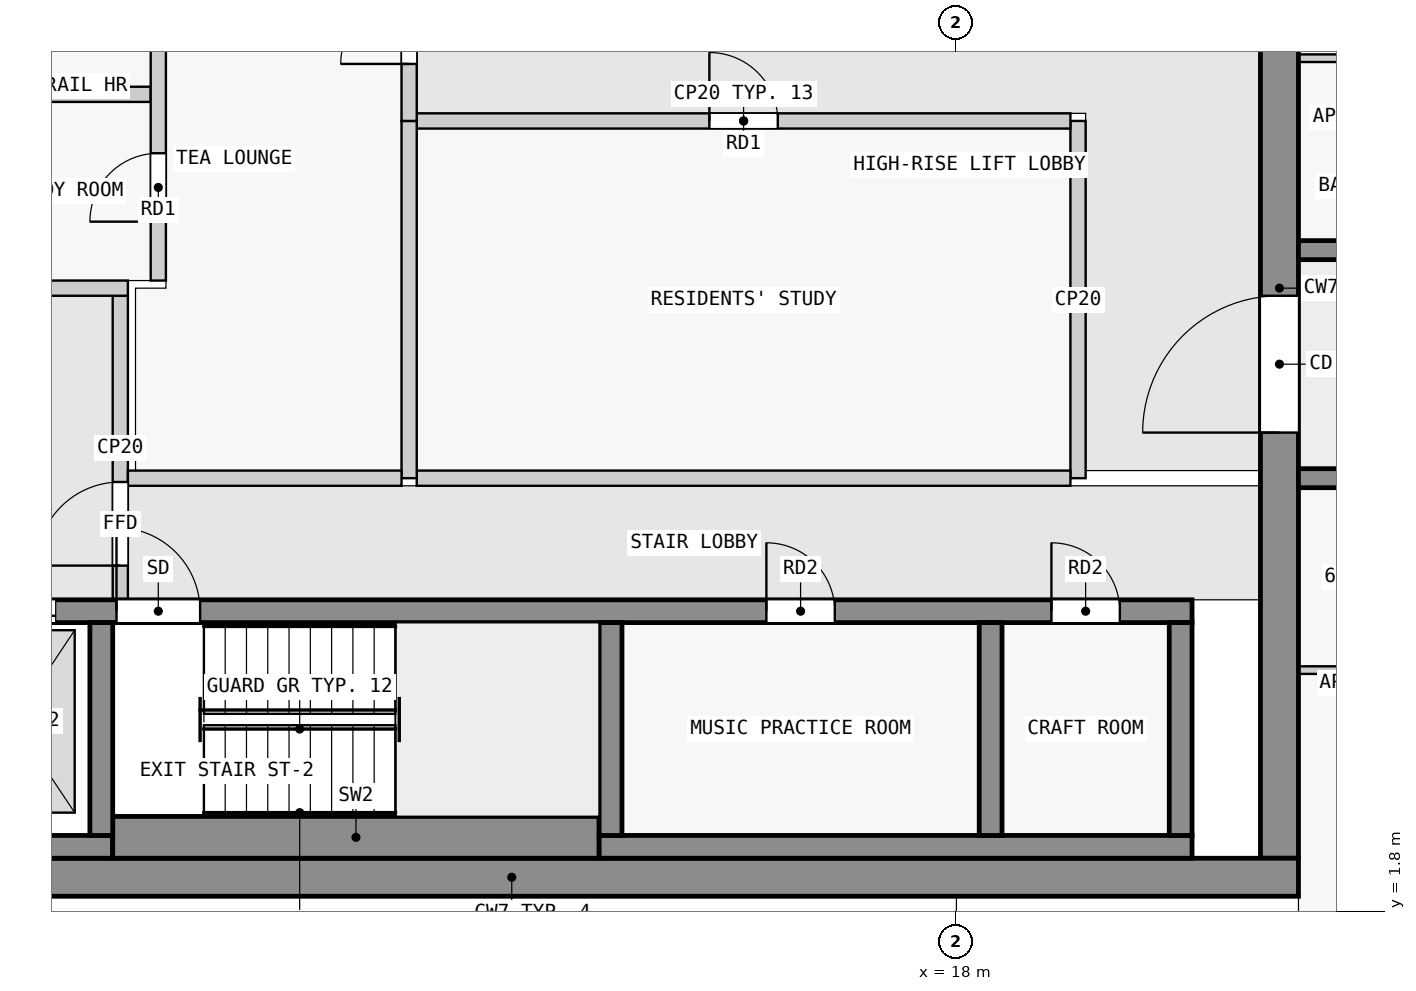
"""IFC4 building model, lengths in metres.
Left out: names, types, materials, properties, quantities, classifications, styles, units other than length and angle.
Written with IfcOpenShell. Run it as: python <this file> out.ifc"""

import sys

from ifc_helpers import new_model, si_unit, direction, frame, frame_2d, origin, place, context, subcontext, project, spatial, rectangle, extrude, element, fill, save


model = new_model("IFC4")
c1 = context("Model", 3, precision=1e-05, world=origin(), true_north=direction((0.0, 1.0)))
c2 = subcontext(c1, "Body", "Model", "MODEL_VIEW")
j1 = project(units=[si_unit("LENGTHUNIT", "METRE"), si_unit("PLANEANGLEUNIT", "RADIAN")], contexts=[c1])
p1 = place(None, origin())
s1 = spatial("IfcSite", under=j1, at=p1, CompositionType="ELEMENT")
p2 = place(p1, origin())
s2 = spatial("IfcBuilding", under=s1, at=p2, CompositionType="ELEMENT")
p3 = place(p2, frame((0.0, 0.0, 245.9)))
s3 = spatial("IfcBuildingStorey", under=s2, at=p3, CompositionType="ELEMENT", Elevation=245.9)
p4 = place(p3, frame((1.8, 2.25, 0.0), z_axis=(0.0, 0.0, 1.0), x_axis=(1.0, 0.0, 0.0)))
e1 = element("IfcWall", 1, at=p4, inside=s3, PredefinedType="SHEAR", context=c2, shape_type="SweptSolid", body=[
    extrude(rectangle(XDim=20.7, YDim=0.5, at=frame_2d((10.35, 0.0))), origin(), (0.0, 0.0, 1.0), 3.25),
])
p5 = place(p3, frame((22.25, 2.5, 0.0), z_axis=(0.0, 0.0, 1.0), x_axis=(0.0, 1.0, 0.0)))
e2 = element("IfcWall", 2, at=p5, inside=s3, PredefinedType="SHEAR", context=c2, shape_type="SweptSolid", body=[
    extrude(rectangle(XDim=15.0, YDim=0.5, at=frame_2d((7.5, 0.0))), origin(), (0.0, 0.0, 1.0), 3.25),
])
p6 = place(p5, frame((5.6, 0.0, 0.0)))
e3 = element("IfcOpeningElement", 3, at=p6, cuts=e2, PredefinedType="OPENING", context=c2, shape_type="SweptSolid", body=[
    extrude(rectangle(XDim=1.8, YDim=2.1, at=frame_2d((0.9, 1.05))), frame((0.0, 0.26, 0.0), z_axis=(0.0, -1.0, 0.0), x_axis=(1.0, 0.0, 0.0)), (0.0, 0.0, 1.0), 0.52),
])
p7 = place(p3, frame((2.3, 2.65, 0.0), z_axis=(0.0, 0.0, 1.0), x_axis=(1.0, 0.0, 0.0)))
e4 = element("IfcWall", 4, at=p7, inside=s3, PredefinedType="SHEAR", context=c2, shape_type="SweptSolid", body=[
    extrude(rectangle(XDim=4.6, YDim=0.3, at=frame_2d((2.3, 0.0))), origin(), (0.0, 0.0, 1.0), 3.25),
])
p8 = place(p3, frame((6.9, 2.775, 0.0), z_axis=(0.0, 0.0, 1.0), x_axis=(1.0, 0.0, 0.0)))
e5 = element("IfcWall", 5, at=p8, inside=s3, PredefinedType="SHEAR", context=c2, shape_type="SweptSolid", body=[
    extrude(rectangle(XDim=6.4, YDim=0.55, at=frame_2d((3.2, 0.0))), origin(), (0.0, 0.0, 1.0), 3.25),
])
p9 = place(p3, frame((13.3, 2.65, 0.0), z_axis=(0.0, 0.0, 1.0), x_axis=(1.0, 0.0, 0.0)))
e6 = element("IfcWall", 6, at=p9, inside=s3, PredefinedType="SHEAR", context=c2, shape_type="SweptSolid", body=[
    extrude(rectangle(XDim=7.8, YDim=0.3, at=frame_2d((3.9, 0.0))), origin(), (0.0, 0.0, 1.0), 3.25),
])
for number, where, z_axis, x_axis in (
    (7, (6.75, 2.8, 0.0), (0.0, 0.0, 1.0), (0.0, 1.0, 0.0)),
    (8, (13.45, 2.8, 0.0), (0.0, 0.0, 1.0), (0.0, 1.0, 0.0)),
    (9, (18.45, 2.8, 0.0), (0.0, 0.0, 1.0), (0.0, 1.0, 0.0)),
    (10, (20.95, 2.8, 0.0), (0.0, 0.0, 1.0), (0.0, 1.0, 0.0)),
):
    element("IfcWall", number, at=place(p3, frame(where, z_axis=z_axis, x_axis=x_axis)), inside=s3, PredefinedType="SHEAR", context=c2, shape_type="SweptSolid", body=[
        extrude(rectangle(XDim=2.8, YDim=0.3, at=frame_2d((1.4, 0.0))), origin(), (0.0, 0.0, 1.0), 3.25),
    ])
p10 = place(p3, frame((2.3, 5.75, 0.0), z_axis=(0.0, 0.0, 1.0), x_axis=(1.0, 0.0, 0.0)))
e11 = element("IfcWall", 11, at=p10, inside=s3, PredefinedType="SHEAR", context=c2, shape_type="SweptSolid", body=[
    extrude(rectangle(XDim=18.8, YDim=0.3, at=frame_2d((9.4, 0.0))), origin(), (0.0, 0.0, 1.0), 3.25),
])
p11 = place(p10, frame((4.65, 0.0, 0.0)))
e12 = element("IfcOpeningElement", 12, at=p11, cuts=e11, PredefinedType="OPENING", context=c2, shape_type="SweptSolid", body=[
    extrude(rectangle(XDim=1.1, YDim=2.1, at=frame_2d((0.55, 1.05))), frame((0.0, 0.16, 0.0), z_axis=(0.0, -1.0, 0.0), x_axis=(1.0, 0.0, 0.0)), (0.0, 0.0, 1.0), 0.32),
])
p12 = place(p10, frame((0.45, 0.0, 0.0)))
e13 = element("IfcOpeningElement", 13, at=p12, cuts=e11, PredefinedType="OPENING", context=c2, shape_type="SweptSolid", body=[
    extrude(rectangle(XDim=1.1, YDim=2.1, at=frame_2d((0.55, 1.05))), frame((0.0, 0.16, 0.0), z_axis=(0.0, -1.0, 0.0), x_axis=(1.0, 0.0, 0.0)), (0.0, 0.0, 1.0), 0.32),
])
p13 = place(p10, frame((2.75, 0.0, 0.0)))
e14 = element("IfcOpeningElement", 14, at=p13, cuts=e11, PredefinedType="OPENING", context=c2, shape_type="SweptSolid", body=[
    extrude(rectangle(XDim=1.1, YDim=2.1, at=frame_2d((0.55, 1.05))), frame((0.0, 0.16, 0.0), z_axis=(0.0, -1.0, 0.0), x_axis=(1.0, 0.0, 0.0)), (0.0, 0.0, 1.0), 0.32),
])
p14 = place(p10, frame((13.2, 0.0, 0.0)))
e15 = element("IfcOpeningElement", 15, at=p14, cuts=e11, PredefinedType="OPENING", context=c2, shape_type="SweptSolid", body=[
    extrude(rectangle(XDim=0.9, YDim=2.1, at=frame_2d((0.45, 1.05))), frame((0.0, 0.16, 0.0), z_axis=(0.0, -1.0, 0.0), x_axis=(1.0, 0.0, 0.0)), (0.0, 0.0, 1.0), 0.32),
])
p15 = place(p10, frame((16.95, 0.0, 0.0)))
e16 = element("IfcOpeningElement", 16, at=p15, cuts=e11, PredefinedType="OPENING", context=c2, shape_type="SweptSolid", body=[
    extrude(rectangle(XDim=0.9, YDim=2.1, at=frame_2d((0.45, 1.05))), frame((0.0, 0.16, 0.0), z_axis=(0.0, -1.0, 0.0), x_axis=(1.0, 0.0, 0.0)), (0.0, 0.0, 1.0), 0.32),
])
p16 = place(p3, frame((22.5, 7.5, 0.0), z_axis=(0.0, 0.0, 1.0), x_axis=(1.0, 0.0, 0.0)))
e17 = element("IfcWall", 17, at=p16, inside=s3, PredefinedType="SHEAR", context=c2, shape_type="SweptSolid", body=[
    extrude(rectangle(XDim=22.5, YDim=0.25, at=frame_2d((11.25, 0.0))), origin(), (0.0, 0.0, 1.0), 3.25),
])
p17 = place(p16, frame((1.75, 0.0, 0.0)))
e18 = element("IfcOpeningElement", 18, at=p17, cuts=e17, PredefinedType="OPENING", context=c2, shape_type="SweptSolid", body=[
    extrude(rectangle(XDim=1.0, YDim=2.1, at=frame_2d((0.5, 1.05))), frame((0.0, 0.135, 0.0), z_axis=(0.0, -1.0, 0.0), x_axis=(1.0, 0.0, 0.0)), (0.0, 0.0, 1.0), 0.27),
])
p18 = place(p16, frame((5.85, 0.0, 0.0)))
e19 = element("IfcOpeningElement", 19, at=p18, cuts=e17, PredefinedType="OPENING", context=c2, shape_type="SweptSolid", body=[
    extrude(rectangle(XDim=1.8, YDim=2.1, at=frame_2d((0.9, 1.05))), frame((0.0, 0.135, 0.0), z_axis=(0.0, -1.0, 0.0), x_axis=(1.0, 0.0, 0.0)), (0.0, 0.0, 1.0), 0.27),
])
p19 = place(p16, frame((13.05, 0.0, 0.0)))
e20 = element("IfcOpeningElement", 20, at=p19, cuts=e17, PredefinedType="OPENING", context=c2, shape_type="SweptSolid", body=[
    extrude(rectangle(XDim=1.0, YDim=2.1, at=frame_2d((0.5, 1.05))), frame((0.0, 0.135, 0.0), z_axis=(0.0, -1.0, 0.0), x_axis=(1.0, 0.0, 0.0)), (0.0, 0.0, 1.0), 0.27),
])
p20 = place(p16, frame((18.75, 0.0, 0.0)))
e21 = element("IfcOpeningElement", 21, at=p20, cuts=e17, PredefinedType="OPENING", context=c2, shape_type="SweptSolid", body=[
    extrude(rectangle(XDim=0.9, YDim=2.1, at=frame_2d((0.45, 1.05))), frame((0.0, 0.135, 0.0), z_axis=(0.0, -1.0, 0.0), x_axis=(1.0, 0.0, 0.0)), (0.0, 0.0, 1.0), 0.27),
])
p21 = place(p16, frame((20.95, 0.0, 0.0)))
e22 = element("IfcOpeningElement", 22, at=p21, cuts=e17, PredefinedType="OPENING", context=c2, shape_type="SweptSolid", body=[
    extrude(rectangle(XDim=1.0, YDim=2.1, at=frame_2d((0.5, 1.05))), frame((0.0, 0.135, 0.0), z_axis=(0.0, -1.0, 0.0), x_axis=(1.0, 0.0, 0.0)), (0.0, 0.0, 1.0), 0.27),
])
p22 = place(p3, frame((22.5, 10.5, 0.0), z_axis=(0.0, 0.0, 1.0), x_axis=(1.0, 0.0, 0.0)))
e23 = element("IfcWall", 23, at=p22, inside=s3, PredefinedType="SHEAR", context=c2, shape_type="SweptSolid", body=[
    extrude(rectangle(XDim=22.5, YDim=0.25, at=frame_2d((11.25, 0.0))), origin(), (0.0, 0.0, 1.0), 3.25),
])
p23 = place(p22, frame((4.05, 0.0, 0.0)))
e24 = element("IfcOpeningElement", 24, at=p23, cuts=e23, PredefinedType="OPENING", context=c2, shape_type="SweptSolid", body=[
    extrude(rectangle(XDim=1.0, YDim=2.1, at=frame_2d((0.5, 1.05))), frame((0.0, 0.135, 0.0), z_axis=(0.0, -1.0, 0.0), x_axis=(1.0, 0.0, 0.0)), (0.0, 0.0, 1.0), 0.27),
])
p24 = place(p22, frame((10.75, 0.0, 0.0)))
e25 = element("IfcOpeningElement", 25, at=p24, cuts=e23, PredefinedType="OPENING", context=c2, shape_type="SweptSolid", body=[
    extrude(rectangle(XDim=1.0, YDim=2.1, at=frame_2d((0.5, 1.05))), frame((0.0, 0.135, 0.0), z_axis=(0.0, -1.0, 0.0), x_axis=(1.0, 0.0, 0.0)), (0.0, 0.0, 1.0), 0.27),
])
p25 = place(p22, frame((16.85, 0.0, 0.0)))
e26 = element("IfcOpeningElement", 26, at=p25, cuts=e23, PredefinedType="OPENING", context=c2, shape_type="SweptSolid", body=[
    extrude(rectangle(XDim=1.0, YDim=2.1, at=frame_2d((0.5, 1.05))), frame((0.0, 0.135, 0.0), z_axis=(0.0, -1.0, 0.0), x_axis=(1.0, 0.0, 0.0)), (0.0, 0.0, 1.0), 0.27),
])
p26 = place(p3, frame((7.0, 5.9, 0.0), z_axis=(0.0, 0.0, 1.0), x_axis=(0.0, 1.0, 0.0)))
e27 = element("IfcWall", 27, at=p26, inside=s3, PredefinedType="PARTITIONING", context=c2, shape_type="SweptSolid", body=[
    extrude(rectangle(XDim=4.0, YDim=0.2, at=frame_2d((2.0, 0.0))), origin(), (0.0, 0.0, 1.0), 3.25),
])
p27 = place(p26, frame((0.45, 0.0, 0.0)))
e28 = element("IfcOpeningElement", 28, at=p27, cuts=e27, PredefinedType="OPENING", context=c2, shape_type="SweptSolid", body=[
    extrude(rectangle(XDim=1.1, YDim=2.1, at=frame_2d((0.55, 1.05))), frame((0.0, 0.11, 0.0), z_axis=(0.0, -1.0, 0.0), x_axis=(1.0, 0.0, 0.0)), (0.0, 0.0, 1.0), 0.22),
])
p28 = place(p3, frame((5.15, 10.0, 0.0), z_axis=(0.0, 0.0, 1.0), x_axis=(1.0, 0.0, 0.0)))
e29 = element("IfcWall", 29, at=p28, inside=s3, PredefinedType="PARTITIONING", context=c2, shape_type="SweptSolid", body=[
    extrude(rectangle(XDim=1.95, YDim=0.2, at=frame_2d((0.975, 0.0))), origin(), (0.0, 0.0, 1.0), 3.25),
])
p29 = place(p3, frame((7.1, 7.5, 0.0), z_axis=(0.0, 0.0, 1.0), x_axis=(1.0, 0.0, 0.0)))
e30 = element("IfcWall", 30, at=p29, inside=s3, PredefinedType="PARTITIONING", context=c2, shape_type="SweptSolid", body=[
    extrude(rectangle(XDim=3.6, YDim=0.2, at=frame_2d((1.8, 0.0))), origin(), (0.0, 0.0, 1.0), 3.25),
])
p30 = place(p3, frame((10.8, 12.2, 0.0), z_axis=(0.0, 0.0, 1.0), x_axis=(0.0, 1.0, 0.0)))
e31 = element("IfcWall", 31, at=p30, inside=s3, PredefinedType="PARTITIONING", context=c2, shape_type="SweptSolid", body=[
    extrude(rectangle(XDim=2.4, YDim=0.2, at=frame_2d((1.2, 0.0))), origin(), (0.0, 0.0, 1.0), 3.25),
])
p31 = place(p30, frame((0.75, 0.0, 0.0)))
e32 = element("IfcOpeningElement", 32, at=p31, cuts=e31, PredefinedType="OPENING", context=c2, shape_type="SweptSolid", body=[
    extrude(rectangle(XDim=0.9, YDim=2.1, at=frame_2d((0.45, 1.05))), frame((0.0, 0.11, 0.0), z_axis=(0.0, -1.0, 0.0), x_axis=(1.0, 0.0, 0.0)), (0.0, 0.0, 1.0), 0.22),
])
p32 = place(p3, frame((10.8, 7.5, 0.0), z_axis=(0.0, 0.0, 1.0), x_axis=(0.0, 1.0, 0.0)))
e33 = element("IfcWall", 33, at=p32, inside=s3, PredefinedType="PARTITIONING", context=c2, shape_type="SweptSolid", body=[
    extrude(rectangle(XDim=4.7, YDim=0.2, at=frame_2d((2.35, 0.0))), origin(), (0.0, 0.0, 1.0), 3.25),
])
p33 = place(p3, frame((10.9, 7.5, 0.0), z_axis=(0.0, 0.0, 1.0), x_axis=(1.0, 0.0, 0.0)))
e34 = element("IfcWall", 34, at=p33, inside=s3, PredefinedType="PARTITIONING", context=c2, shape_type="SweptSolid", body=[
    extrude(rectangle(XDim=8.6, YDim=0.2, at=frame_2d((4.3, 0.0))), origin(), (0.0, 0.0, 1.0), 3.25),
])
p34 = place(p3, frame((19.6, 7.5, 0.0), z_axis=(0.0, 0.0, 1.0), x_axis=(0.0, 1.0, 0.0)))
e35 = element("IfcWall", 35, at=p34, inside=s3, PredefinedType="PARTITIONING", context=c2, shape_type="SweptSolid", body=[
    extrude(rectangle(XDim=4.7, YDim=0.2, at=frame_2d((2.35, 0.0))), origin(), (0.0, 0.0, 1.0), 3.25),
])
p35 = place(p3, frame((10.9, 12.2, 0.0), z_axis=(0.0, 0.0, 1.0), x_axis=(1.0, 0.0, 0.0)))
e36 = element("IfcWall", 36, at=p35, inside=s3, PredefinedType="PARTITIONING", context=c2, shape_type="SweptSolid", body=[
    extrude(rectangle(XDim=8.6, YDim=0.2, at=frame_2d((4.3, 0.0))), origin(), (0.0, 0.0, 1.0), 3.25),
])
p36 = place(p35, frame((3.85, 0.0, 0.0)))
e37 = element("IfcOpeningElement", 37, at=p36, cuts=e36, PredefinedType="OPENING", context=c2, shape_type="SweptSolid", body=[
    extrude(rectangle(XDim=0.9, YDim=2.1, at=frame_2d((0.45, 1.05))), frame((0.0, 0.11, 0.0), z_axis=(0.0, -1.0, 0.0), x_axis=(1.0, 0.0, 0.0)), (0.0, 0.0, 1.0), 0.22),
])
p37 = place(p3, frame((7.5, 10.1, 0.0), z_axis=(0.0, 0.0, 1.0), x_axis=(0.0, 1.0, 0.0)))
e38 = element("IfcWall", 38, at=p37, inside=s3, PredefinedType="PARTITIONING", context=c2, shape_type="SweptSolid", body=[
    extrude(rectangle(XDim=7.4, YDim=0.2, at=frame_2d((3.7, 0.0))), origin(), (0.0, 0.0, 1.0), 3.25),
])
p38 = place(p37, frame((0.775, 0.0, 0.0)))
e39 = element("IfcOpeningElement", 39, at=p38, cuts=e38, PredefinedType="OPENING", context=c2, shape_type="SweptSolid", body=[
    extrude(rectangle(XDim=0.9, YDim=2.1, at=frame_2d((0.45, 1.05))), frame((0.0, 0.11, 0.0), z_axis=(0.0, -1.0, 0.0), x_axis=(1.0, 0.0, 0.0)), (0.0, 0.0, 1.0), 0.22),
])
p39 = place(p37, frame((3.225, 0.0, 0.0)))
e40 = element("IfcOpeningElement", 40, at=p39, cuts=e38, PredefinedType="OPENING", context=c2, shape_type="SweptSolid", body=[
    extrude(rectangle(XDim=0.9, YDim=2.1, at=frame_2d((0.45, 1.05))), frame((0.0, 0.11, 0.0), z_axis=(0.0, -1.0, 0.0), x_axis=(1.0, 0.0, 0.0)), (0.0, 0.0, 1.0), 0.22),
])
p40 = place(p37, frame((5.25, 0.0, 0.0)))
e41 = element("IfcOpeningElement", 41, at=p40, cuts=e38, PredefinedType="OPENING", context=c2, shape_type="SweptSolid", body=[
    extrude(rectangle(XDim=0.9, YDim=2.1, at=frame_2d((0.45, 1.05))), frame((0.0, 0.11, 0.0), z_axis=(0.0, -1.0, 0.0), x_axis=(1.0, 0.0, 0.0)), (0.0, 0.0, 1.0), 0.22),
])
p41 = place(p3, frame((5.15, 12.55, 0.0), z_axis=(0.0, 0.0, 1.0), x_axis=(1.0, 0.0, 0.0)))
e42 = element("IfcWall", 42, at=p41, inside=s3, PredefinedType="PARTITIONING", context=c2, shape_type="SweptSolid", body=[
    extrude(rectangle(XDim=2.25, YDim=0.2, at=frame_2d((1.125, 0.0))), origin(), (0.0, 0.0, 1.0), 3.25),
])
p42 = place(p3, frame((22.5, 4.975, 0.0), z_axis=(0.0, 0.0, 1.0), x_axis=(1.0, 0.0, 0.0)))
e43 = element("IfcWall", 43, at=p42, inside=s3, PredefinedType="PARTITIONING", context=c2, shape_type="SweptSolid", body=[
    extrude(rectangle(XDim=1.45, YDim=0.1, at=frame_2d((0.725, 0.0))), origin(), (0.0, 0.0, 1.0), 3.25),
])
p43 = place(p3, frame((24.25, 13.025, 0.0), z_axis=(0.0, 0.0, 1.0), x_axis=(-1.0, 0.0, 0.0)))
e44 = element("IfcWall", 44, at=p43, inside=s3, PredefinedType="PARTITIONING", context=c2, shape_type="SweptSolid", body=[
    extrude(rectangle(XDim=1.75, YDim=0.1, at=frame_2d((0.875, 0.0))), origin(), (0.0, 0.0, 1.0), 3.25),
])
p44 = place(p27, origin())
e45 = element("IfcDoor", 45, at=p44, inside=s3, OperationType="SINGLE_SWING_LEFT", PredefinedType="DOOR", context=c2, shape_type="SweptSolid", body=[
    extrude(rectangle(XDim=1.1, YDim=2.1, at=frame_2d((0.55, 1.05))), frame((0.0, 0.025, 0.0), z_axis=(0.0, -1.0, 0.0), x_axis=(1.0, 0.0, 0.0)), (0.0, 0.0, 1.0), 0.05),
])
fill(e28, e45)
p45 = place(p31, origin())
e46 = element("IfcDoor", 46, at=p45, inside=s3, OperationType="SINGLE_SWING_LEFT", PredefinedType="DOOR", context=c2, shape_type="SweptSolid", body=[
    extrude(rectangle(XDim=0.9, YDim=2.1, at=frame_2d((0.45, 1.05))), frame((0.0, 0.025, 0.0), z_axis=(0.0, -1.0, 0.0), x_axis=(1.0, 0.0, 0.0)), (0.0, 0.0, 1.0), 0.05),
])
fill(e32, e46)
p46 = place(p36, origin())
e47 = element("IfcDoor", 47, at=p46, inside=s3, OperationType="SINGLE_SWING_LEFT", PredefinedType="DOOR", context=c2, shape_type="SweptSolid", body=[
    extrude(rectangle(XDim=0.9, YDim=2.1, at=frame_2d((0.45, 1.05))), frame((0.0, 0.025, 0.0), z_axis=(0.0, -1.0, 0.0), x_axis=(1.0, 0.0, 0.0)), (0.0, 0.0, 1.0), 0.05),
])
fill(e37, e47)
p47 = place(p11, origin())
e48 = element("IfcDoor", 48, at=p47, inside=s3, OperationType="SINGLE_SWING_LEFT", PredefinedType="DOOR", context=c2, shape_type="SweptSolid", body=[
    extrude(rectangle(XDim=1.1, YDim=2.1, at=frame_2d((0.55, 1.05))), frame((0.0, 0.025, 0.0), z_axis=(0.0, -1.0, 0.0), x_axis=(1.0, 0.0, 0.0)), (0.0, 0.0, 1.0), 0.05),
])
fill(e12, e48)
p48 = place(p13, origin())
e49 = element("IfcDoor", 49, at=p48, inside=s3, OperationType="DOUBLE_DOOR_SLIDING", PredefinedType="DOOR", context=c2, shape_type="SweptSolid", body=[
    extrude(rectangle(XDim=1.1, YDim=2.1, at=frame_2d((0.55, 1.05))), frame((0.0, 0.025, 0.0), z_axis=(0.0, -1.0, 0.0), x_axis=(1.0, 0.0, 0.0)), (0.0, 0.0, 1.0), 0.05),
])
fill(e14, e49)
p49 = place(p6, origin())
e50 = element("IfcDoor", 50, at=p49, inside=s3, OperationType="DOUBLE_DOOR_SINGLE_SWING", PredefinedType="DOOR", context=c2, shape_type="SweptSolid", body=[
    extrude(rectangle(XDim=1.8, YDim=2.1, at=frame_2d((0.9, 1.05))), frame((0.0, 0.025, 0.0), z_axis=(0.0, -1.0, 0.0), x_axis=(1.0, 0.0, 0.0)), (0.0, 0.0, 1.0), 0.05),
])
fill(e3, e50)
p50 = place(p38, origin())
e51 = element("IfcDoor", 51, at=p50, inside=s3, OperationType="SINGLE_SWING_RIGHT", PredefinedType="DOOR", context=c2, shape_type="SweptSolid", body=[
    extrude(rectangle(XDim=0.9, YDim=2.1, at=frame_2d((0.45, 1.05))), frame((0.0, 0.025, 0.0), z_axis=(0.0, -1.0, 0.0), x_axis=(1.0, 0.0, 0.0)), (0.0, 0.0, 1.0), 0.05),
])
fill(e39, e51)
p51 = place(p14, origin())
e52 = element("IfcDoor", 52, at=p51, inside=s3, OperationType="SINGLE_SWING_LEFT", PredefinedType="DOOR", context=c2, shape_type="SweptSolid", body=[
    extrude(rectangle(XDim=0.9, YDim=2.1, at=frame_2d((0.45, 1.05))), frame((0.0, 0.025, 0.0), z_axis=(0.0, -1.0, 0.0), x_axis=(1.0, 0.0, 0.0)), (0.0, 0.0, 1.0), 0.05),
])
fill(e15, e52)
p52 = place(p15, origin())
e53 = element("IfcDoor", 53, at=p52, inside=s3, OperationType="SINGLE_SWING_LEFT", PredefinedType="DOOR", context=c2, shape_type="SweptSolid", body=[
    extrude(rectangle(XDim=0.9, YDim=2.1, at=frame_2d((0.45, 1.05))), frame((0.0, 0.025, 0.0), z_axis=(0.0, -1.0, 0.0), x_axis=(1.0, 0.0, 0.0)), (0.0, 0.0, 1.0), 0.05),
])
fill(e16, e53)
save(model, sys.argv[1])
